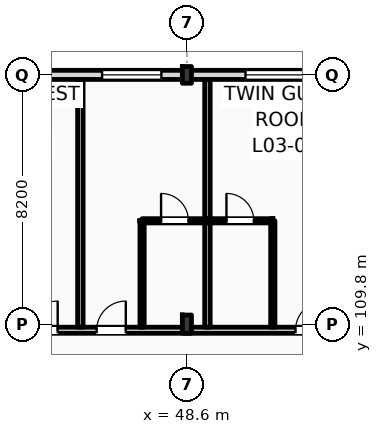
"""IFC4 building model, lengths in metres.
Left out: names, types, materials, properties, quantities, classifications, styles, units other than length and angle.
Written with IfcOpenShell. Run it as: python <this file> out.ifc"""

import sys

from ifc_helpers import new_model, si_unit, direction, frame, frame_2d, origin, origin_2d, place, context, subcontext, project, spatial, rectangle, i_section, extrude, element, fill, save


model = new_model("IFC4")
c1 = context("Model", 3, precision=1e-05, world=origin(), true_north=direction((0.0, 1.0)))
c2 = subcontext(c1, "Body", "Model", "MODEL_VIEW")
j1 = project(units=[si_unit("LENGTHUNIT", "METRE"), si_unit("PLANEANGLEUNIT", "RADIAN")], contexts=[c1])
p1 = place(None, origin())
s1 = spatial("IfcSite", under=j1, at=p1, CompositionType="ELEMENT")
p2 = place(p1, origin())
s2 = spatial("IfcBuilding", under=s1, at=p2, CompositionType="ELEMENT")
p3 = place(p2, frame((0.0, 0.0, 16.2)))
s3 = spatial("IfcBuildingStorey", under=s2, at=p3, CompositionType="ELEMENT", Elevation=16.2)
p4 = place(p3, frame((48.6, 109.8, 0.0), z_axis=(0.0, 0.0, 1.0), x_axis=(1.0, 0.0, 0.0)))
e1 = element("IfcColumn", 1, at=p4, inside=s3, PredefinedType="COLUMN", context=c2, shape_type="SweptSolid", body=[
    extrude(i_section(OverallWidth=0.3, OverallDepth=0.6, WebThickness=0.015, FlangeThickness=0.03, FilletRadius=0.027, at=origin_2d()), origin(), (0.0, 0.0, 1.0), 4.2),
])
p5 = place(p3, frame((48.6, 118.0, 0.0), z_axis=(0.0, 0.0, 1.0), x_axis=(1.0, 0.0, 0.0)))
e2 = element("IfcColumn", 2, at=p5, inside=s3, PredefinedType="COLUMN", context=c2, shape_type="SweptSolid", body=[
    extrude(i_section(OverallWidth=0.3, OverallDepth=0.55, WebThickness=0.015, FlangeThickness=0.029, FilletRadius=0.027, at=origin_2d()), origin(), (0.0, 0.0, 1.0), 4.2),
])
p6 = place(p3, frame((22.5, 118.0, 0.0), z_axis=(0.0, 0.0, 1.0), x_axis=(1.0, 0.0, 0.0)))
e3 = element("IfcWall", 3, at=p6, inside=s3, PredefinedType="STANDARD", context=c2, shape_type="SweptSolid", body=[
    extrude(rectangle(XDim=97.5, YDim=0.3, at=frame_2d((48.75, 0.0))), origin(), (0.0, 0.0, 1.0), 3.36),
])
p7 = place(p6, frame((3.721, 0.0, 0.9)))
e4 = element("IfcOpeningElement", 4, at=p7, cuts=e3, PredefinedType="OPENING", context=c2, shape_type="SweptSolid", body=[
    extrude(rectangle(XDim=0.9, YDim=1.8, at=frame_2d((0.45, 0.9))), frame((0.0, 0.16, 0.0), z_axis=(0.0, -1.0, 0.0), x_axis=(1.0, 0.0, 0.0)), (0.0, 0.0, 1.0), 0.32),
])
p8 = place(p6, frame((6.447, 0.0, 0.9)))
e5 = element("IfcOpeningElement", 5, at=p8, cuts=e3, PredefinedType="OPENING", context=c2, shape_type="SweptSolid", body=[
    extrude(rectangle(XDim=1.35, YDim=1.85, at=frame_2d((0.675, 0.925))), frame((0.0, 0.16, 0.0), z_axis=(0.0, -1.0, 0.0), x_axis=(1.0, 0.0, 0.0)), (0.0, 0.0, 1.0), 0.32),
])
p9 = place(p6, frame((11.363, 0.0, 0.9)))
e6 = element("IfcOpeningElement", 6, at=p9, cuts=e3, PredefinedType="OPENING", context=c2, shape_type="SweptSolid", body=[
    extrude(rectangle(XDim=1.5, YDim=1.9, at=frame_2d((0.75, 0.95))), frame((0.0, 0.16, 0.0), z_axis=(0.0, -1.0, 0.0), x_axis=(1.0, 0.0, 0.0)), (0.0, 0.0, 1.0), 0.32),
])
p10 = place(p6, frame((15.078, 0.0, 0.9)))
e7 = element("IfcOpeningElement", 7, at=p10, cuts=e3, PredefinedType="OPENING", context=c2, shape_type="SweptSolid", body=[
    extrude(rectangle(XDim=1.65, YDim=1.95, at=frame_2d((0.825, 0.975))), frame((0.0, 0.16, 0.0), z_axis=(0.0, -1.0, 0.0), x_axis=(1.0, 0.0, 0.0)), (0.0, 0.0, 1.0), 0.32),
])
p11 = place(p6, frame((19.395, 0.0, 0.9)))
e8 = element("IfcOpeningElement", 8, at=p11, cuts=e3, PredefinedType="OPENING", context=c2, shape_type="SweptSolid", body=[
    extrude(rectangle(XDim=1.8, YDim=2.0, at=frame_2d((0.9, 1.0))), frame((0.0, 0.16, 0.0), z_axis=(0.0, -1.0, 0.0), x_axis=(1.0, 0.0, 0.0)), (0.0, 0.0, 1.0), 0.32),
])
p12 = place(p6, frame((23.31, 0.0, 0.9)))
e9 = element("IfcOpeningElement", 9, at=p12, cuts=e3, PredefinedType="OPENING", context=c2, shape_type="SweptSolid", body=[
    extrude(rectangle(XDim=1.95, YDim=2.05, at=frame_2d((0.975, 1.025))), frame((0.0, 0.16, 0.0), z_axis=(0.0, -1.0, 0.0), x_axis=(1.0, 0.0, 0.0)), (0.0, 0.0, 1.0), 0.32),
])
p13 = place(p6, frame((28.026, 0.0, 0.9)))
e10 = element("IfcOpeningElement", 10, at=p13, cuts=e3, PredefinedType="OPENING", context=c2, shape_type="SweptSolid", body=[
    extrude(rectangle(XDim=2.1, YDim=2.1, at=frame_2d((1.05, 1.05))), frame((0.0, 0.16, 0.0), z_axis=(0.0, -1.0, 0.0), x_axis=(1.0, 0.0, 0.0)), (0.0, 0.0, 1.0), 0.32),
])
p14 = place(p6, frame((31.941, 0.0, 0.9)))
e11 = element("IfcOpeningElement", 11, at=p14, cuts=e3, PredefinedType="OPENING", context=c2, shape_type="SweptSolid", body=[
    extrude(rectangle(XDim=1.1, YDim=2.15, at=frame_2d((0.55, 1.075))), frame((0.0, 0.16, 0.0), z_axis=(0.0, -1.0, 0.0), x_axis=(1.0, 0.0, 0.0)), (0.0, 0.0, 1.0), 0.32),
])
p15 = place(p6, frame((36.657, 0.0, 0.9)))
e12 = element("IfcOpeningElement", 12, at=p15, cuts=e3, PredefinedType="OPENING", context=c2, shape_type="SweptSolid", body=[
    extrude(rectangle(XDim=2.4, YDim=2.2, at=frame_2d((1.2, 1.1))), frame((0.0, 0.16, 0.0), z_axis=(0.0, -1.0, 0.0), x_axis=(1.0, 0.0, 0.0)), (0.0, 0.0, 1.0), 0.32),
])
p16 = place(p6, frame((42.574, 0.0, 0.9)))
e13 = element("IfcOpeningElement", 13, at=p16, cuts=e3, PredefinedType="OPENING", context=c2, shape_type="SweptSolid", body=[
    extrude(rectangle(XDim=1.35, YDim=2.25, at=frame_2d((0.675, 1.125))), frame((0.0, 0.16, 0.0), z_axis=(0.0, -1.0, 0.0), x_axis=(1.0, 0.0, 0.0)), (0.0, 0.0, 1.0), 0.32),
])
p17 = place(p6, frame((45.289, 0.0, 0.9)))
e14 = element("IfcOpeningElement", 14, at=p17, cuts=e3, PredefinedType="OPENING", context=c2, shape_type="SweptSolid", body=[
    extrude(rectangle(XDim=2.7, YDim=2.28, at=frame_2d((1.35, 1.14))), frame((0.0, 0.16, 0.0), z_axis=(0.0, -1.0, 0.0), x_axis=(1.0, 0.0, 0.0)), (0.0, 0.0, 1.0), 0.32),
])
p18 = place(p6, frame((50.406, 0.0, 0.9)))
e15 = element("IfcOpeningElement", 15, at=p18, cuts=e3, PredefinedType="OPENING", context=c2, shape_type="SweptSolid", body=[
    extrude(rectangle(XDim=1.8, YDim=2.28, at=frame_2d((0.9, 1.14))), frame((0.0, 0.16, 0.0), z_axis=(0.0, -1.0, 0.0), x_axis=(1.0, 0.0, 0.0)), (0.0, 0.0, 1.0), 0.32),
])
p19 = place(p6, frame((53.922, 0.0, 0.9)))
e16 = element("IfcOpeningElement", 16, at=p19, cuts=e3, PredefinedType="OPENING", context=c2, shape_type="SweptSolid", body=[
    extrude(rectangle(XDim=1.8, YDim=2.28, at=frame_2d((0.9, 1.14))), frame((0.0, 0.16, 0.0), z_axis=(0.0, -1.0, 0.0), x_axis=(1.0, 0.0, 0.0)), (0.0, 0.0, 1.0), 0.32),
])
p20 = place(p6, frame((58.332, 0.0, 0.9)))
e17 = element("IfcOpeningElement", 17, at=p20, cuts=e3, PredefinedType="OPENING", context=c2, shape_type="SweptSolid", body=[
    extrude(rectangle(XDim=2.961, YDim=2.28, at=frame_2d((1.48, 1.14))), frame((0.0, 0.16, 0.0), z_axis=(0.0, -1.0, 0.0), x_axis=(1.0, 0.0, 0.0)), (0.0, 0.0, 1.0), 0.32),
])
p21 = place(p6, frame((62.513, 0.0, 0.9)))
e18 = element("IfcOpeningElement", 18, at=p21, cuts=e3, PredefinedType="OPENING", context=c2, shape_type="SweptSolid", body=[
    extrude(rectangle(XDim=1.8, YDim=2.28, at=frame_2d((0.9, 1.14))), frame((0.0, 0.16, 0.0), z_axis=(0.0, -1.0, 0.0), x_axis=(1.0, 0.0, 0.0)), (0.0, 0.0, 1.0), 0.32),
])
p22 = place(p6, frame((67.114, 0.0, 0.9)))
e19 = element("IfcOpeningElement", 19, at=p22, cuts=e3, PredefinedType="OPENING", context=c2, shape_type="SweptSolid", body=[
    extrude(rectangle(XDim=2.961, YDim=2.28, at=frame_2d((1.48, 1.14))), frame((0.0, 0.16, 0.0), z_axis=(0.0, -1.0, 0.0), x_axis=(1.0, 0.0, 0.0)), (0.0, 0.0, 1.0), 0.32),
])
p23 = place(p6, frame((73.695, 0.0, 0.9)))
e20 = element("IfcOpeningElement", 20, at=p23, cuts=e3, PredefinedType="OPENING", context=c2, shape_type="SweptSolid", body=[
    extrude(rectangle(XDim=1.1, YDim=2.28, at=frame_2d((0.55, 1.14))), frame((0.0, 0.16, 0.0), z_axis=(0.0, -1.0, 0.0), x_axis=(1.0, 0.0, 0.0)), (0.0, 0.0, 1.0), 0.32),
])
p24 = place(p6, frame((75.895, 0.0, 0.9)))
e21 = element("IfcOpeningElement", 21, at=p24, cuts=e3, PredefinedType="OPENING", context=c2, shape_type="SweptSolid", body=[
    extrude(rectangle(XDim=2.961, YDim=2.28, at=frame_2d((1.48, 1.14))), frame((0.0, 0.16, 0.0), z_axis=(0.0, -1.0, 0.0), x_axis=(1.0, 0.0, 0.0)), (0.0, 0.0, 1.0), 0.32),
])
p25 = place(p6, frame((81.676, 0.0, 0.9)))
e22 = element("IfcOpeningElement", 22, at=p25, cuts=e3, PredefinedType="OPENING", context=c2, shape_type="SweptSolid", body=[
    extrude(rectangle(XDim=1.8, YDim=2.28, at=frame_2d((0.9, 1.14))), frame((0.0, 0.16, 0.0), z_axis=(0.0, -1.0, 0.0), x_axis=(1.0, 0.0, 0.0)), (0.0, 0.0, 1.0), 0.32),
])
p26 = place(p6, frame((84.677, 0.0, 0.9)))
e23 = element("IfcOpeningElement", 23, at=p26, cuts=e3, PredefinedType="OPENING", context=c2, shape_type="SweptSolid", body=[
    extrude(rectangle(XDim=2.961, YDim=2.28, at=frame_2d((1.48, 1.14))), frame((0.0, 0.16, 0.0), z_axis=(0.0, -1.0, 0.0), x_axis=(1.0, 0.0, 0.0)), (0.0, 0.0, 1.0), 0.32),
])
p27 = place(p6, frame((89.999, 0.0, 0.9)))
e24 = element("IfcOpeningElement", 24, at=p27, cuts=e3, PredefinedType="OPENING", context=c2, shape_type="SweptSolid", body=[
    extrude(rectangle(XDim=1.1, YDim=1.5, at=frame_2d((0.55, 0.75))), frame((0.0, 0.16, 0.0), z_axis=(0.0, -1.0, 0.0), x_axis=(1.0, 0.0, 0.0)), (0.0, 0.0, 1.0), 0.32),
])
p28 = place(p6, frame((94.35, 0.0, 0.9)))
e25 = element("IfcOpeningElement", 25, at=p28, cuts=e3, PredefinedType="OPENING", context=c2, shape_type="SweptSolid", body=[
    extrude(rectangle(XDim=1.25, YDim=1.6, at=frame_2d((0.625, 0.8))), frame((0.0, 0.16, 0.0), z_axis=(0.0, -1.0, 0.0), x_axis=(1.0, 0.0, 0.0)), (0.0, 0.0, 1.0), 0.32),
])
p29 = place(p3, frame((10.65, 109.6, 0.0), z_axis=(0.0, 0.0, 1.0), x_axis=(1.0, 0.0, 0.0)))
e26 = element("IfcWall", 26, at=p29, inside=s3, PredefinedType="PARTITIONING", context=c2, shape_type="SweptSolid", body=[
    extrude(rectangle(XDim=109.21, YDim=0.2, at=frame_2d((54.605, 0.0))), origin(), (0.0, 0.0, 1.0), 3.36),
])
p30 = place(p29, frame((15.43, 0.0, 0.0)))
e27 = element("IfcOpeningElement", 27, at=p30, cuts=e26, PredefinedType="OPENING", context=c2, shape_type="SweptSolid", body=[
    extrude(rectangle(XDim=1.02, YDim=2.2, at=frame_2d((0.51, 1.1))), frame((0.0, 0.11, 0.0), z_axis=(0.0, -1.0, 0.0), x_axis=(1.0, 0.0, 0.0)), (0.0, 0.0, 1.0), 0.22),
])
p31 = place(p29, frame((19.537, 0.0, 0.0)))
e28 = element("IfcOpeningElement", 28, at=p31, cuts=e26, PredefinedType="OPENING", context=c2, shape_type="SweptSolid", body=[
    extrude(rectangle(XDim=1.02, YDim=2.2, at=frame_2d((0.51, 1.1))), frame((0.0, 0.11, 0.0), z_axis=(0.0, -1.0, 0.0), x_axis=(1.0, 0.0, 0.0)), (0.0, 0.0, 1.0), 0.22),
])
p32 = place(p29, frame((23.928, 0.0, 0.0)))
e29 = element("IfcOpeningElement", 29, at=p32, cuts=e26, PredefinedType="OPENING", context=c2, shape_type="SweptSolid", body=[
    extrude(rectangle(XDim=1.02, YDim=2.2, at=frame_2d((0.51, 1.1))), frame((0.0, 0.11, 0.0), z_axis=(0.0, -1.0, 0.0), x_axis=(1.0, 0.0, 0.0)), (0.0, 0.0, 1.0), 0.22),
])
p33 = place(p29, frame((26.169, 0.0, 0.0)))
e30 = element("IfcOpeningElement", 30, at=p33, cuts=e26, PredefinedType="OPENING", context=c2, shape_type="SweptSolid", body=[
    extrude(rectangle(XDim=1.02, YDim=2.2, at=frame_2d((0.51, 1.1))), frame((0.0, 0.11, 0.0), z_axis=(0.0, -1.0, 0.0), x_axis=(1.0, 0.0, 0.0)), (0.0, 0.0, 1.0), 0.22),
])
p34 = place(p29, frame((32.739, 0.0, 0.0)))
e31 = element("IfcOpeningElement", 31, at=p34, cuts=e26, PredefinedType="OPENING", context=c2, shape_type="SweptSolid", body=[
    extrude(rectangle(XDim=0.96, YDim=2.2, at=frame_2d((0.48, 1.1))), frame((0.0, 0.11, 0.0), z_axis=(0.0, -1.0, 0.0), x_axis=(1.0, 0.0, 0.0)), (0.0, 0.0, 1.0), 0.22),
])
p35 = place(p29, frame((34.98, 0.0, 0.0)))
e32 = element("IfcOpeningElement", 32, at=p35, cuts=e26, PredefinedType="OPENING", context=c2, shape_type="SweptSolid", body=[
    extrude(rectangle(XDim=0.96, YDim=2.2, at=frame_2d((0.48, 1.1))), frame((0.0, 0.11, 0.0), z_axis=(0.0, -1.0, 0.0), x_axis=(1.0, 0.0, 0.0)), (0.0, 0.0, 1.0), 0.22),
])
p36 = place(p29, frame((41.521, 0.0, 0.0)))
e33 = element("IfcOpeningElement", 33, at=p36, cuts=e26, PredefinedType="OPENING", context=c2, shape_type="SweptSolid", body=[
    extrude(rectangle(XDim=0.96, YDim=2.2, at=frame_2d((0.48, 1.1))), frame((0.0, 0.11, 0.0), z_axis=(0.0, -1.0, 0.0), x_axis=(1.0, 0.0, 0.0)), (0.0, 0.0, 1.0), 0.22),
])
p37 = place(p29, frame((43.512, 0.0, 0.0)))
e34 = element("IfcOpeningElement", 34, at=p37, cuts=e26, PredefinedType="OPENING", context=c2, shape_type="SweptSolid", body=[
    extrude(rectangle(XDim=0.96, YDim=2.2, at=frame_2d((0.48, 1.1))), frame((0.0, 0.11, 0.0), z_axis=(0.0, -1.0, 0.0), x_axis=(1.0, 0.0, 0.0)), (0.0, 0.0, 1.0), 0.22),
])
p38 = place(p29, frame((50.303, 0.0, 0.0)))
e35 = element("IfcOpeningElement", 35, at=p38, cuts=e26, PredefinedType="OPENING", context=c2, shape_type="SweptSolid", body=[
    extrude(rectangle(XDim=0.96, YDim=2.2, at=frame_2d((0.48, 1.1))), frame((0.0, 0.11, 0.0), z_axis=(0.0, -1.0, 0.0), x_axis=(1.0, 0.0, 0.0)), (0.0, 0.0, 1.0), 0.22),
])
p39 = place(p29, frame((54.944, 0.0, 0.0)))
e36 = element("IfcOpeningElement", 36, at=p39, cuts=e26, PredefinedType="OPENING", context=c2, shape_type="SweptSolid", body=[
    extrude(rectangle(XDim=0.96, YDim=2.2, at=frame_2d((0.48, 1.1))), frame((0.0, 0.11, 0.0), z_axis=(0.0, -1.0, 0.0), x_axis=(1.0, 0.0, 0.0)), (0.0, 0.0, 1.0), 0.22),
])
p40 = place(p29, frame((59.085, 0.0, 0.0)))
e37 = element("IfcOpeningElement", 37, at=p40, cuts=e26, PredefinedType="OPENING", context=c2, shape_type="SweptSolid", body=[
    extrude(rectangle(XDim=0.96, YDim=2.2, at=frame_2d((0.48, 1.1))), frame((0.0, 0.11, 0.0), z_axis=(0.0, -1.0, 0.0), x_axis=(1.0, 0.0, 0.0)), (0.0, 0.0, 1.0), 0.22),
])
p41 = place(p29, frame((63.476, 0.0, 0.0)))
e38 = element("IfcOpeningElement", 38, at=p41, cuts=e26, PredefinedType="OPENING", context=c2, shape_type="SweptSolid", body=[
    extrude(rectangle(XDim=0.96, YDim=2.2, at=frame_2d((0.48, 1.1))), frame((0.0, 0.11, 0.0), z_axis=(0.0, -1.0, 0.0), x_axis=(1.0, 0.0, 0.0)), (0.0, 0.0, 1.0), 0.22),
])
p42 = place(p29, frame((65.716, 0.0, 0.0)))
e39 = element("IfcOpeningElement", 39, at=p42, cuts=e26, PredefinedType="OPENING", context=c2, shape_type="SweptSolid", body=[
    extrude(rectangle(XDim=0.96, YDim=2.2, at=frame_2d((0.48, 1.1))), frame((0.0, 0.11, 0.0), z_axis=(0.0, -1.0, 0.0), x_axis=(1.0, 0.0, 0.0)), (0.0, 0.0, 1.0), 0.22),
])
p43 = place(p29, frame((72.257, 0.0, 0.0)))
e40 = element("IfcOpeningElement", 40, at=p43, cuts=e26, PredefinedType="OPENING", context=c2, shape_type="SweptSolid", body=[
    extrude(rectangle(XDim=0.96, YDim=2.2, at=frame_2d((0.48, 1.1))), frame((0.0, 0.11, 0.0), z_axis=(0.0, -1.0, 0.0), x_axis=(1.0, 0.0, 0.0)), (0.0, 0.0, 1.0), 0.22),
])
p44 = place(p29, frame((74.498, 0.0, 0.0)))
e41 = element("IfcOpeningElement", 41, at=p44, cuts=e26, PredefinedType="OPENING", context=c2, shape_type="SweptSolid", body=[
    extrude(rectangle(XDim=0.96, YDim=2.2, at=frame_2d((0.48, 1.1))), frame((0.0, 0.11, 0.0), z_axis=(0.0, -1.0, 0.0), x_axis=(1.0, 0.0, 0.0)), (0.0, 0.0, 1.0), 0.22),
])
p45 = place(p29, frame((81.039, 0.0, 0.0)))
e42 = element("IfcOpeningElement", 42, at=p45, cuts=e26, PredefinedType="OPENING", context=c2, shape_type="SweptSolid", body=[
    extrude(rectangle(XDim=0.96, YDim=2.2, at=frame_2d((0.48, 1.1))), frame((0.0, 0.11, 0.0), z_axis=(0.0, -1.0, 0.0), x_axis=(1.0, 0.0, 0.0)), (0.0, 0.0, 1.0), 0.22),
])
p46 = place(p29, frame((85.68, 0.0, 0.0)))
e43 = element("IfcOpeningElement", 43, at=p46, cuts=e26, PredefinedType="OPENING", context=c2, shape_type="SweptSolid", body=[
    extrude(rectangle(XDim=0.96, YDim=2.2, at=frame_2d((0.48, 1.1))), frame((0.0, 0.11, 0.0), z_axis=(0.0, -1.0, 0.0), x_axis=(1.0, 0.0, 0.0)), (0.0, 0.0, 1.0), 0.22),
])
p47 = place(p29, frame((89.82, 0.0, 0.0)))
e44 = element("IfcOpeningElement", 44, at=p47, cuts=e26, PredefinedType="OPENING", context=c2, shape_type="SweptSolid", body=[
    extrude(rectangle(XDim=0.96, YDim=2.2, at=frame_2d((0.48, 1.1))), frame((0.0, 0.11, 0.0), z_axis=(0.0, -1.0, 0.0), x_axis=(1.0, 0.0, 0.0)), (0.0, 0.0, 1.0), 0.22),
])
p48 = place(p29, frame((94.211, 0.0, 0.0)))
e45 = element("IfcOpeningElement", 45, at=p48, cuts=e26, PredefinedType="OPENING", context=c2, shape_type="SweptSolid", body=[
    extrude(rectangle(XDim=0.96, YDim=2.2, at=frame_2d((0.48, 1.1))), frame((0.0, 0.11, 0.0), z_axis=(0.0, -1.0, 0.0), x_axis=(1.0, 0.0, 0.0)), (0.0, 0.0, 1.0), 0.22),
])
p49 = place(p29, frame((98.602, 0.0, 0.0)))
e46 = element("IfcOpeningElement", 46, at=p49, cuts=e26, PredefinedType="OPENING", context=c2, shape_type="SweptSolid", body=[
    extrude(rectangle(XDim=0.96, YDim=2.2, at=frame_2d((0.48, 1.1))), frame((0.0, 0.11, 0.0), z_axis=(0.0, -1.0, 0.0), x_axis=(1.0, 0.0, 0.0)), (0.0, 0.0, 1.0), 0.22),
])
p50 = place(p29, frame((102.993, 0.0, 0.0)))
e47 = element("IfcOpeningElement", 47, at=p50, cuts=e26, PredefinedType="OPENING", context=c2, shape_type="SweptSolid", body=[
    extrude(rectangle(XDim=0.96, YDim=2.2, at=frame_2d((0.48, 1.1))), frame((0.0, 0.11, 0.0), z_axis=(0.0, -1.0, 0.0), x_axis=(1.0, 0.0, 0.0)), (0.0, 0.0, 1.0), 0.22),
])
p51 = place(p29, frame((105.269, 0.0, 0.0)))
e48 = element("IfcOpeningElement", 48, at=p51, cuts=e26, PredefinedType="OPENING", context=c2, shape_type="SweptSolid", body=[
    extrude(rectangle(XDim=0.96, YDim=2.2, at=frame_2d((0.48, 1.1))), frame((0.0, 0.11, 0.0), z_axis=(0.0, -1.0, 0.0), x_axis=(1.0, 0.0, 0.0)), (0.0, 0.0, 1.0), 0.22),
])
p52 = place(p29, frame((2.716, 0.0, 0.0)))
e49 = element("IfcOpeningElement", 49, at=p52, cuts=e26, PredefinedType="OPENING", context=c2, shape_type="SweptSolid", body=[
    extrude(rectangle(XDim=1.35, YDim=2.25, at=frame_2d((0.675, 1.125))), frame((0.0, 0.11, 0.0), z_axis=(0.0, -1.0, 0.0), x_axis=(1.0, 0.0, 0.0)), (0.0, 0.0, 1.0), 0.22),
])
p53 = place(p29, frame((6.65, 0.0, 0.0)))
e50 = element("IfcOpeningElement", 50, at=p53, cuts=e26, PredefinedType="OPENING", context=c2, shape_type="SweptSolid", body=[
    extrude(rectangle(XDim=1.35, YDim=2.25, at=frame_2d((0.675, 1.125))), frame((0.0, 0.11, 0.0), z_axis=(0.0, -1.0, 0.0), x_axis=(1.0, 0.0, 0.0)), (0.0, 0.0, 1.0), 0.22),
])
p54 = place(p29, frame((10.583, 0.0, 0.0)))
e51 = element("IfcOpeningElement", 51, at=p54, cuts=e26, PredefinedType="OPENING", context=c2, shape_type="SweptSolid", body=[
    extrude(rectangle(XDim=1.35, YDim=2.25, at=frame_2d((0.675, 1.125))), frame((0.0, 0.11, 0.0), z_axis=(0.0, -1.0, 0.0), x_axis=(1.0, 0.0, 0.0)), (0.0, 0.0, 1.0), 0.22),
])
for number, where, z_axis, x_axis in (
    (52, (45.095, 109.7, 0.0), (0.0, 0.0, 1.0), (0.0, 1.0, 0.0)),
    (53, (49.275, 109.7, 0.0), (0.0, 0.0, 1.0), (0.0, 1.0, 0.0)),
):
    element("IfcWall", number, at=place(p3, frame(where, z_axis=z_axis, x_axis=x_axis)), inside=s3, PredefinedType="PARTITIONING", context=c2, shape_type="SweptSolid", body=[
        extrude(rectangle(XDim=8.15, YDim=0.18, at=frame_2d((4.075, 0.0))), origin(), (0.0, 0.0, 1.0), 3.92),
    ])
p55 = place(p3, frame((47.125, 109.7, 0.0), z_axis=(0.0, 0.0, 1.0), x_axis=(0.0, 1.0, 0.0)))
e54 = element("IfcWall", 54, at=p55, inside=s3, PredefinedType="PARTITIONING", context=c2, shape_type="SweptSolid", body=[
    extrude(rectangle(XDim=3.5, YDim=0.14, at=frame_2d((1.75, 0.0))), origin(), (0.0, 0.0, 1.0), 3.92),
])
p56 = place(p3, frame((47.125, 113.2, 0.0), z_axis=(0.0, 0.0, 1.0), x_axis=(1.0, 0.0, 0.0)))
e55 = element("IfcWall", 55, at=p56, inside=s3, PredefinedType="PARTITIONING", context=c2, shape_type="SweptSolid", body=[
    extrude(rectangle(XDim=2.15, YDim=0.14, at=frame_2d((1.075, 0.0))), origin(), (0.0, 0.0, 1.0), 3.92),
])
p57 = place(p56, frame((0.625, 0.0, 0.0)))
e56 = element("IfcOpeningElement", 56, at=p57, cuts=e55, PredefinedType="OPENING", context=c2, shape_type="SweptSolid", body=[
    extrude(rectangle(XDim=0.9, YDim=2.1, at=frame_2d((0.45, 1.05))), frame((0.0, 0.08, 0.0), z_axis=(0.0, -1.0, 0.0), x_axis=(1.0, 0.0, 0.0)), (0.0, 0.0, 1.0), 0.16),
])
p58 = place(p3, frame((51.425, 109.7, 0.0), z_axis=(0.0, 0.0, 1.0), x_axis=(0.0, 1.0, 0.0)))
e57 = element("IfcWall", 57, at=p58, inside=s3, PredefinedType="PARTITIONING", context=c2, shape_type="SweptSolid", body=[
    extrude(rectangle(XDim=3.5, YDim=0.14, at=frame_2d((1.75, 0.0))), origin(), (0.0, 0.0, 1.0), 3.61),
])
p59 = place(p3, frame((49.275, 113.2, 0.0), z_axis=(0.0, 0.0, 1.0), x_axis=(1.0, 0.0, 0.0)))
e58 = element("IfcWall", 58, at=p59, inside=s3, PredefinedType="PARTITIONING", context=c2, shape_type="SweptSolid", body=[
    extrude(rectangle(XDim=2.15, YDim=0.14, at=frame_2d((1.075, 0.0))), origin(), (0.0, 0.0, 1.0), 3.92),
])
p60 = place(p59, frame((0.625, 0.0, 0.0)))
e59 = element("IfcOpeningElement", 59, at=p60, cuts=e58, PredefinedType="OPENING", context=c2, shape_type="SweptSolid", body=[
    extrude(rectangle(XDim=0.9, YDim=2.1, at=frame_2d((0.45, 1.05))), frame((0.0, 0.08, 0.0), z_axis=(0.0, -1.0, 0.0), x_axis=(1.0, 0.0, 0.0)), (0.0, 0.0, 1.0), 0.16),
])
p61 = place(p12, origin())
e60 = element("IfcWindow", 60, at=p61, inside=s3, PartitioningType="DOUBLE_PANEL_VERTICAL", PredefinedType="WINDOW", context=c2, shape_type="SweptSolid", body=[
    extrude(rectangle(XDim=1.95, YDim=2.05, at=frame_2d((0.975, 1.025))), frame((0.0, 0.03, 0.0), z_axis=(0.0, -1.0, 0.0), x_axis=(1.0, 0.0, 0.0)), (0.0, 0.0, 1.0), 0.06),
])
fill(e9, e60)
p62 = place(p13, origin())
e61 = element("IfcWindow", 61, at=p62, inside=s3, PartitioningType="DOUBLE_PANEL_VERTICAL", PredefinedType="WINDOW", context=c2, shape_type="SweptSolid", body=[
    extrude(rectangle(XDim=2.1, YDim=2.1, at=frame_2d((1.05, 1.05))), frame((0.0, 0.03, 0.0), z_axis=(0.0, -1.0, 0.0), x_axis=(1.0, 0.0, 0.0)), (0.0, 0.0, 1.0), 0.06),
])
fill(e10, e61)
p63 = place(p34, origin())
e62 = element("IfcDoor", 62, at=p63, inside=s3, OperationType="SINGLE_SWING_RIGHT", PredefinedType="DOOR", context=c2, shape_type="SweptSolid", body=[
    extrude(rectangle(XDim=0.96, YDim=2.2, at=frame_2d((0.48, 1.1))), frame((0.0, 0.025, 0.0), z_axis=(0.0, -1.0, 0.0), x_axis=(1.0, 0.0, 0.0)), (0.0, 0.0, 1.0), 0.05),
])
fill(e31, e62)
p64 = place(p35, origin())
e63 = element("IfcDoor", 63, at=p64, inside=s3, OperationType="SINGLE_SWING_RIGHT", PredefinedType="DOOR", context=c2, shape_type="SweptSolid", body=[
    extrude(rectangle(XDim=0.96, YDim=2.2, at=frame_2d((0.48, 1.1))), frame((0.0, 0.025, 0.0), z_axis=(0.0, -1.0, 0.0), x_axis=(1.0, 0.0, 0.0)), (0.0, 0.0, 1.0), 0.05),
])
fill(e32, e63)
p65 = place(p57, origin())
e64 = element("IfcDoor", 64, at=p65, inside=s3, OperationType="SINGLE_SWING_LEFT", PredefinedType="DOOR", context=c2, shape_type="SweptSolid", body=[
    extrude(rectangle(XDim=0.9, YDim=2.1, at=frame_2d((0.45, 1.05))), frame((0.0, 0.025, 0.0), z_axis=(0.0, -1.0, 0.0), x_axis=(1.0, 0.0, 0.0)), (0.0, 0.0, 1.0), 0.05),
])
fill(e56, e64)
p66 = place(p36, origin())
e65 = element("IfcDoor", 65, at=p66, inside=s3, OperationType="SINGLE_SWING_RIGHT", PredefinedType="DOOR", context=c2, shape_type="SweptSolid", body=[
    extrude(rectangle(XDim=0.96, YDim=2.2, at=frame_2d((0.48, 1.1))), frame((0.0, 0.025, 0.0), z_axis=(0.0, -1.0, 0.0), x_axis=(1.0, 0.0, 0.0)), (0.0, 0.0, 1.0), 0.05),
])
fill(e33, e65)
p67 = place(p60, origin())
e66 = element("IfcDoor", 66, at=p67, inside=s3, OperationType="SINGLE_SWING_LEFT", PredefinedType="DOOR", context=c2, shape_type="SweptSolid", body=[
    extrude(rectangle(XDim=0.9, YDim=2.1, at=frame_2d((0.45, 1.05))), frame((0.0, 0.025, 0.0), z_axis=(0.0, -1.0, 0.0), x_axis=(1.0, 0.0, 0.0)), (0.0, 0.0, 1.0), 0.05),
])
fill(e59, e66)
save(model, sys.argv[1])
